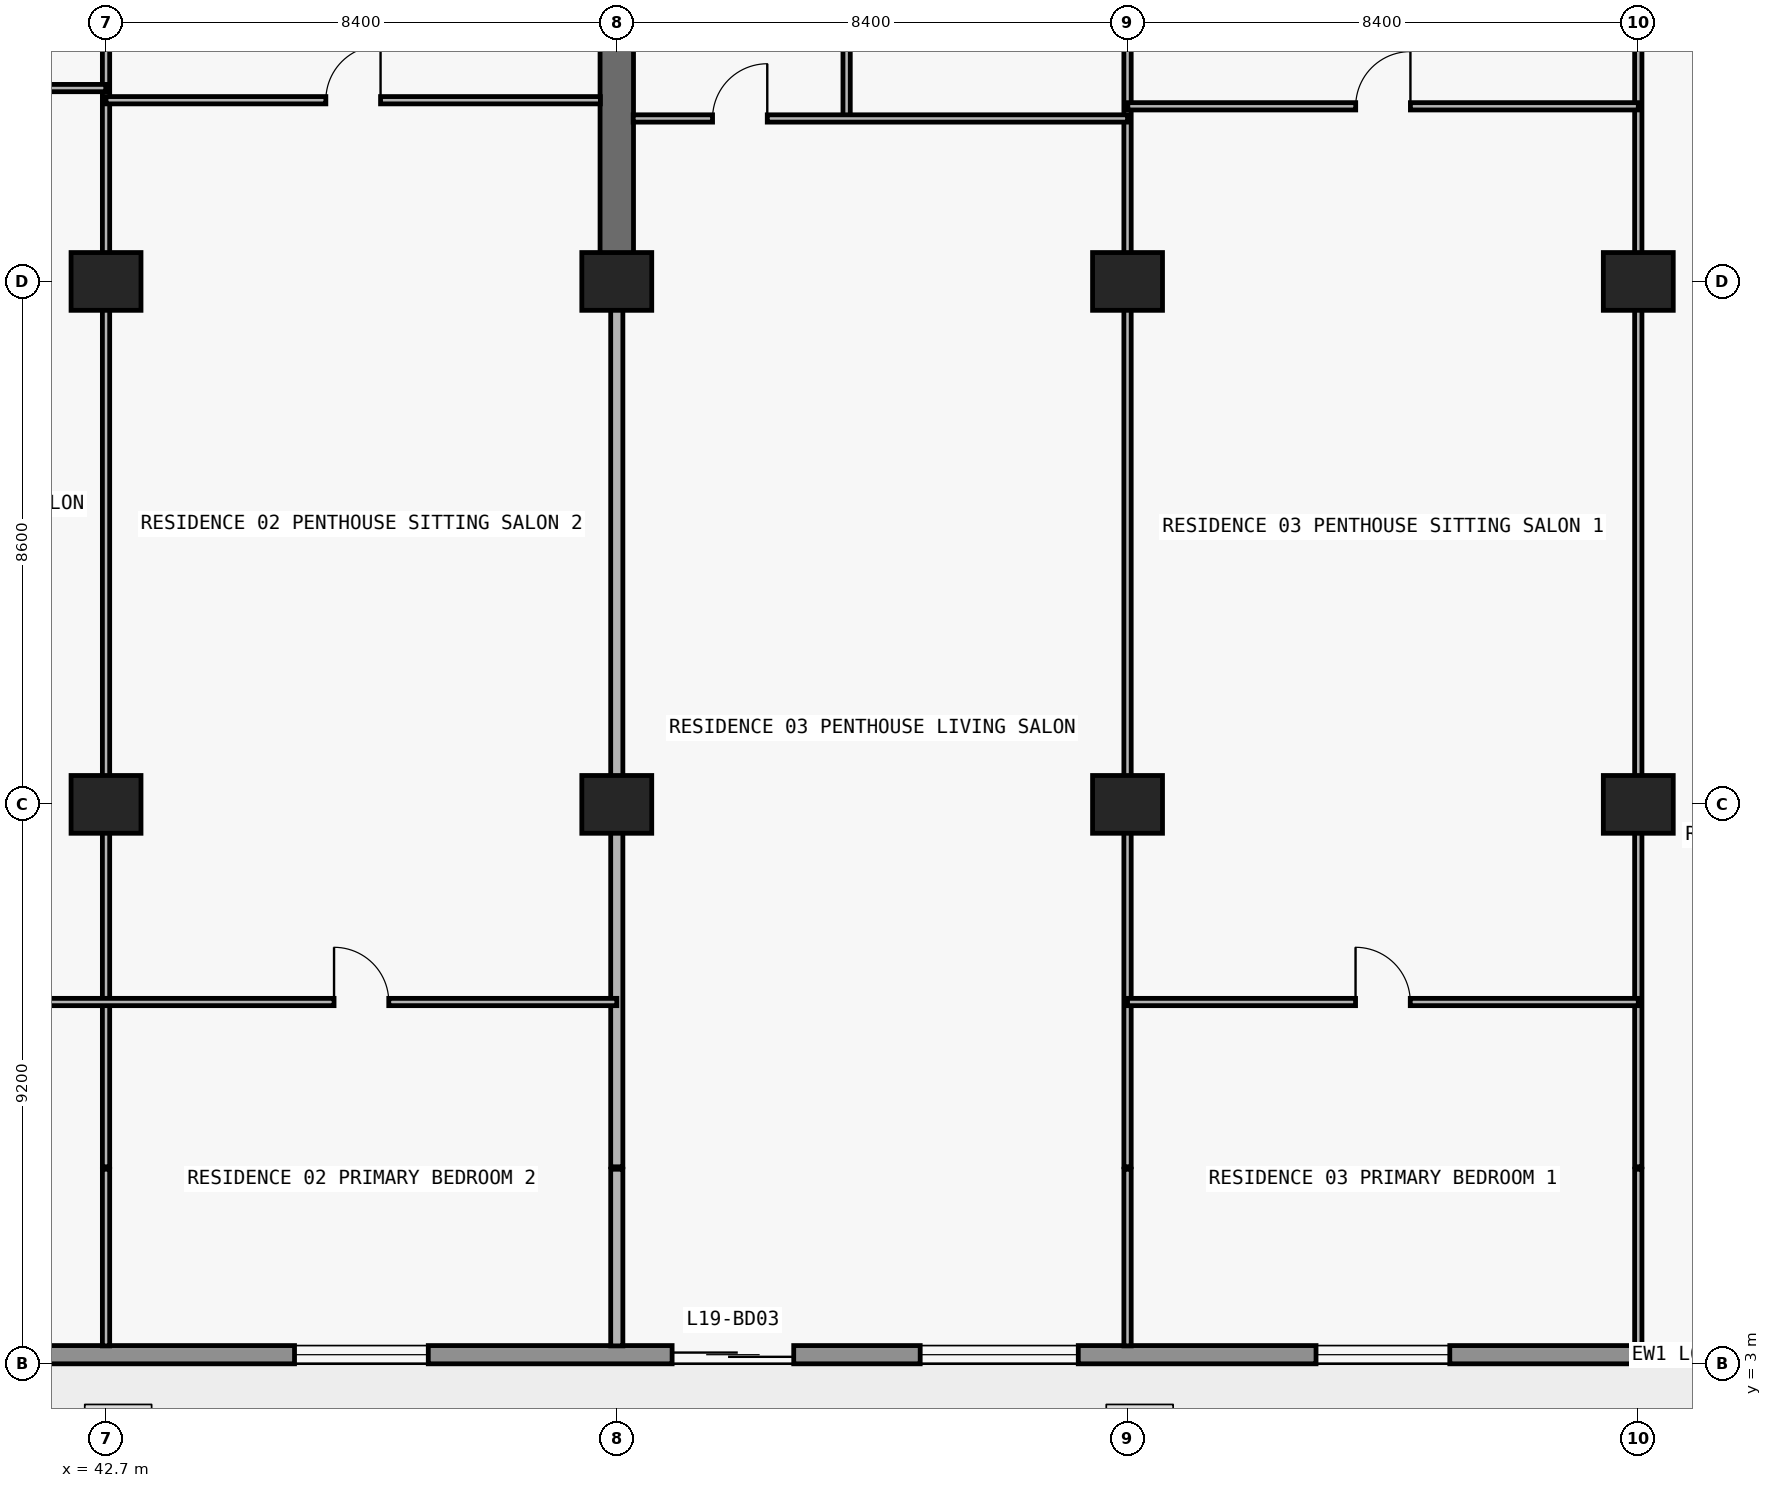
"""IFC4 building model, lengths in metres.
Left out: names, types, materials, properties, quantities, classifications, styles, units other than length and angle.
Written with IfcOpenShell. Run it as: python <this file> out.ifc"""

import sys

from ifc_helpers import new_model, si_unit, direction, frame, frame_2d, origin, origin_2d, place, context, subcontext, project, spatial, rectangle, extrude, element, fill, save


model = new_model("IFC4")
c1 = context("Model", 3, precision=1e-05, world=origin(), true_north=direction((0.0, 1.0)))
c2 = subcontext(c1, "Body", "Model", "MODEL_VIEW")
j1 = project(units=[si_unit("LENGTHUNIT", "METRE"), si_unit("PLANEANGLEUNIT", "RADIAN")], contexts=[c1])
p1 = place(None, origin())
s1 = spatial("IfcSite", under=j1, at=p1, CompositionType="ELEMENT")
p2 = place(p1, origin())
s2 = spatial("IfcBuilding", under=s1, at=p2, CompositionType="ELEMENT")
p3 = place(p2, frame((0.0, 0.0, 72.9)))
s3 = spatial("IfcBuildingStorey", under=s2, at=p3, CompositionType="ELEMENT", Elevation=72.9)
for number, where, z_axis, x_axis in (
    (1, (42.7, 12.2, 0.0), (0.0, 0.0, 1.0), (1.0, 0.0, 0.0)),
    (2, (51.1, 12.2, 0.0), (0.0, 0.0, 1.0), (1.0, 0.0, 0.0)),
    (3, (59.5, 12.2, 0.0), (0.0, 0.0, 1.0), (1.0, 0.0, 0.0)),
    (4, (67.9, 12.2, 0.0), (0.0, 0.0, 1.0), (1.0, 0.0, 0.0)),
    (5, (42.7, 20.8, 0.0), (0.0, 0.0, 1.0), (1.0, 0.0, 0.0)),
    (6, (51.1, 20.8, 0.0), (0.0, 0.0, 1.0), (1.0, 0.0, 0.0)),
    (7, (59.5, 20.8, 0.0), (0.0, 0.0, 1.0), (1.0, 0.0, 0.0)),
    (8, (67.9, 20.8, 0.0), (0.0, 0.0, 1.0), (1.0, 0.0, 0.0)),
):
    element("IfcColumn", number, at=place(p3, frame(where, z_axis=z_axis, x_axis=x_axis)), inside=s3, PredefinedType="COLUMN", context=c2, shape_type="SweptSolid", body=[
        extrude(rectangle(XDim=1.15, YDim=0.95, at=origin_2d()), origin(), (0.0, 0.0, 1.0), 3.05),
    ])
p4 = place(p3, frame((51.1, 20.8, 0.0), z_axis=(0.0, 0.0, 1.0), x_axis=(0.0, 1.0, 0.0)))
e9 = element("IfcWall", 9, at=p4, inside=s3, PredefinedType="SHEAR", context=c2, shape_type="SweptSolid", body=[
    extrude(rectangle(XDim=8.6, YDim=0.55, at=frame_2d((4.3, 0.0))), origin(), (0.0, 0.0, 1.0), 3.05),
])
p5 = place(p3, frame((72.7, 3.15, 0.0), z_axis=(0.0, 0.0, 1.0), x_axis=(-1.0, 0.0, 0.0)))
e10 = element("IfcWall", 10, at=p5, inside=s3, PredefinedType="STANDARD", context=c2, shape_type="SweptSolid", body=[
    extrude(rectangle(XDim=67.6, YDim=0.3, at=frame_2d((33.8, 0.0))), origin(), (0.0, 0.0, 1.0), 3.05),
])
p6 = place(p5, frame((59.89, 0.0, 0.0)))
e11 = element("IfcOpeningElement", 11, at=p6, cuts=e10, PredefinedType="OPENING", context=c2, shape_type="SweptSolid", body=[
    extrude(rectangle(XDim=2.0, YDim=2.3, at=frame_2d((1.0, 1.15))), frame((0.0, 0.16, 0.0), z_axis=(0.0, -1.0, 0.0), x_axis=(1.0, 0.0, 0.0)), (0.0, 0.0, 1.0), 0.32),
])
p7 = place(p5, frame((55.21, 0.0, 0.65)))
e12 = element("IfcOpeningElement", 12, at=p7, cuts=e10, PredefinedType="OPENING", context=c2, shape_type="SweptSolid", body=[
    extrude(rectangle(XDim=2.6, YDim=1.85, at=frame_2d((1.3, 0.925))), frame((0.0, 0.16, 0.0), z_axis=(0.0, -1.0, 0.0), x_axis=(1.0, 0.0, 0.0)), (0.0, 0.0, 1.0), 0.32),
])
p8 = place(p5, frame((49.1, 0.0, 0.85)))
e13 = element("IfcOpeningElement", 13, at=p8, cuts=e10, PredefinedType="OPENING", context=c2, shape_type="SweptSolid", body=[
    extrude(rectangle(XDim=2.2, YDim=1.55, at=frame_2d((1.1, 0.775))), frame((0.0, 0.16, 0.0), z_axis=(0.0, -1.0, 0.0), x_axis=(1.0, 0.0, 0.0)), (0.0, 0.0, 1.0), 0.32),
])
p9 = place(p5, frame((43.09, 0.0, 0.0)))
e14 = element("IfcOpeningElement", 14, at=p9, cuts=e10, PredefinedType="OPENING", context=c2, shape_type="SweptSolid", body=[
    extrude(rectangle(XDim=2.0, YDim=2.3, at=frame_2d((1.0, 1.15))), frame((0.0, 0.16, 0.0), z_axis=(0.0, -1.0, 0.0), x_axis=(1.0, 0.0, 0.0)), (0.0, 0.0, 1.0), 0.32),
])
p10 = place(p5, frame((38.41, 0.0, 0.65)))
e15 = element("IfcOpeningElement", 15, at=p10, cuts=e10, PredefinedType="OPENING", context=c2, shape_type="SweptSolid", body=[
    extrude(rectangle(XDim=2.6, YDim=1.85, at=frame_2d((1.3, 0.925))), frame((0.0, 0.16, 0.0), z_axis=(0.0, -1.0, 0.0), x_axis=(1.0, 0.0, 0.0)), (0.0, 0.0, 1.0), 0.32),
])
p11 = place(p5, frame((32.7, 0.0, 0.85)))
e16 = element("IfcOpeningElement", 16, at=p11, cuts=e10, PredefinedType="OPENING", context=c2, shape_type="SweptSolid", body=[
    extrude(rectangle(XDim=2.2, YDim=1.55, at=frame_2d((1.1, 0.775))), frame((0.0, 0.16, 0.0), z_axis=(0.0, -1.0, 0.0), x_axis=(1.0, 0.0, 0.0)), (0.0, 0.0, 1.0), 0.32),
])
p12 = place(p5, frame((24.7, 0.0, 0.85)))
e17 = element("IfcOpeningElement", 17, at=p12, cuts=e10, PredefinedType="OPENING", context=c2, shape_type="SweptSolid", body=[
    extrude(rectangle(XDim=2.2, YDim=1.55, at=frame_2d((1.1, 0.775))), frame((0.0, 0.16, 0.0), z_axis=(0.0, -1.0, 0.0), x_axis=(1.0, 0.0, 0.0)), (0.0, 0.0, 1.0), 0.32),
])
p13 = place(p5, frame((18.69, 0.0, 0.0)))
e18 = element("IfcOpeningElement", 18, at=p13, cuts=e10, PredefinedType="OPENING", context=c2, shape_type="SweptSolid", body=[
    extrude(rectangle(XDim=2.0, YDim=2.3, at=frame_2d((1.0, 1.15))), frame((0.0, 0.16, 0.0), z_axis=(0.0, -1.0, 0.0), x_axis=(1.0, 0.0, 0.0)), (0.0, 0.0, 1.0), 0.32),
])
p14 = place(p5, frame((14.01, 0.0, 0.65)))
e19 = element("IfcOpeningElement", 19, at=p14, cuts=e10, PredefinedType="OPENING", context=c2, shape_type="SweptSolid", body=[
    extrude(rectangle(XDim=2.6, YDim=1.85, at=frame_2d((1.3, 0.925))), frame((0.0, 0.16, 0.0), z_axis=(0.0, -1.0, 0.0), x_axis=(1.0, 0.0, 0.0)), (0.0, 0.0, 1.0), 0.32),
])
p15 = place(p5, frame((7.9, 0.0, 0.85)))
e20 = element("IfcOpeningElement", 20, at=p15, cuts=e10, PredefinedType="OPENING", context=c2, shape_type="SweptSolid", body=[
    extrude(rectangle(XDim=2.2, YDim=1.55, at=frame_2d((1.1, 0.775))), frame((0.0, 0.16, 0.0), z_axis=(0.0, -1.0, 0.0), x_axis=(1.0, 0.0, 0.0)), (0.0, 0.0, 1.0), 0.32),
])
p16 = place(p3, frame((42.7, 3.295, 0.0), z_axis=(0.0, 0.0, 1.0), x_axis=(0.0, 1.0, 0.0)))
e21 = element("IfcWall", 21, at=p16, inside=s3, PredefinedType="PARTITIONING", context=c2, shape_type="SweptSolid", body=[
    extrude(rectangle(XDim=2.905, YDim=0.12, at=frame_2d((1.453, 0.0))), origin(), (0.0, 0.0, 1.0), 3.05),
])
p17 = place(p3, frame((42.7, 6.24, 0.0), z_axis=(0.0, 0.0, 1.0), x_axis=(0.0, 1.0, 0.0)))
e22 = element("IfcWall", 22, at=p17, inside=s3, PredefinedType="PARTITIONING", context=c2, shape_type="SweptSolid", body=[
    extrude(rectangle(XDim=27.96, YDim=0.12, at=frame_2d((13.98, 0.0))), origin(), (0.0, 0.0, 1.0), 2.11),
])
p18 = place(p17, frame((19.49, 0.0, 0.0)))
e23 = element("IfcOpeningElement", 23, at=p18, cuts=e22, PredefinedType="OPENING", context=c2, shape_type="SweptSolid", body=[
    extrude(rectangle(XDim=0.9, YDim=2.06, at=frame_2d((0.45, 1.03))), frame((0.0, 0.07, 0.0), z_axis=(0.0, -1.0, 0.0), x_axis=(1.0, 0.0, 0.0)), (0.0, 0.0, 1.0), 0.14),
])
p19 = place(p3, frame((51.1, 3.295, 0.0), z_axis=(0.0, 0.0, 1.0), x_axis=(0.0, 1.0, 0.0)))
e24 = element("IfcWall", 24, at=p19, inside=s3, PredefinedType="PARTITIONING", context=c2, shape_type="SweptSolid", body=[
    extrude(rectangle(XDim=2.905, YDim=0.2, at=frame_2d((1.453, 0.0))), origin(), (0.0, 0.0, 1.0), 3.05),
])
p20 = place(p3, frame((51.1, 6.24, 0.0), z_axis=(0.0, 0.0, 1.0), x_axis=(0.0, 1.0, 0.0)))
e25 = element("IfcWall", 25, at=p20, inside=s3, PredefinedType="PARTITIONING", context=c2, shape_type="SweptSolid", body=[
    extrude(rectangle(XDim=14.555, YDim=0.2, at=frame_2d((7.277, 0.0))), origin(), (0.0, 0.0, 1.0), 2.11),
])
p21 = place(p3, frame((54.88, 23.48, 0.0), z_axis=(0.0, 0.0, 1.0), x_axis=(0.0, 1.0, 0.0)))
e26 = element("IfcWall", 26, at=p21, inside=s3, PredefinedType="PARTITIONING", context=c2, shape_type="SweptSolid", body=[
    extrude(rectangle(XDim=4.8, YDim=0.12, at=frame_2d((2.4, 0.0))), origin(), (0.0, 0.0, 1.0), 3.05),
])
p22 = place(p21, frame((1.95, 0.0, 0.0)))
e27 = element("IfcOpeningElement", 27, at=p22, cuts=e26, PredefinedType="OPENING", context=c2, shape_type="SweptSolid", body=[
    extrude(rectangle(XDim=0.9, YDim=2.15, at=frame_2d((0.45, 1.075))), frame((0.0, 0.07, 0.0), z_axis=(0.0, -1.0, 0.0), x_axis=(1.0, 0.0, 0.0)), (0.0, 0.0, 1.0), 0.14),
])
p23 = place(p3, frame((59.5, 3.295, 0.0), z_axis=(0.0, 0.0, 1.0), x_axis=(0.0, 1.0, 0.0)))
e28 = element("IfcWall", 28, at=p23, inside=s3, PredefinedType="PARTITIONING", context=c2, shape_type="SweptSolid", body=[
    extrude(rectangle(XDim=2.905, YDim=0.12, at=frame_2d((1.453, 0.0))), origin(), (0.0, 0.0, 1.0), 3.05),
])
p24 = place(p3, frame((59.5, 6.24, 0.0), z_axis=(0.0, 0.0, 1.0), x_axis=(0.0, 1.0, 0.0)))
e29 = element("IfcWall", 29, at=p24, inside=s3, PredefinedType="PARTITIONING", context=c2, shape_type="SweptSolid", body=[
    extrude(rectangle(XDim=27.96, YDim=0.12, at=frame_2d((13.98, 0.0))), origin(), (0.0, 0.0, 1.0), 2.11),
])
p25 = place(p24, frame((19.19, 0.0, 0.0)))
e30 = element("IfcOpeningElement", 30, at=p25, cuts=e29, PredefinedType="OPENING", context=c2, shape_type="SweptSolid", body=[
    extrude(rectangle(XDim=0.9, YDim=2.06, at=frame_2d((0.45, 1.03))), frame((0.0, 0.07, 0.0), z_axis=(0.0, -1.0, 0.0), x_axis=(1.0, 0.0, 0.0)), (0.0, 0.0, 1.0), 0.14),
])
p26 = place(p3, frame((67.9, 3.295, 0.0), z_axis=(0.0, 0.0, 1.0), x_axis=(0.0, 1.0, 0.0)))
e31 = element("IfcWall", 31, at=p26, inside=s3, PredefinedType="PARTITIONING", context=c2, shape_type="SweptSolid", body=[
    extrude(rectangle(XDim=2.905, YDim=0.12, at=frame_2d((1.453, 0.0))), origin(), (0.0, 0.0, 1.0), 3.05),
])
p27 = place(p3, frame((67.9, 6.24, 0.0), z_axis=(0.0, 0.0, 1.0), x_axis=(0.0, 1.0, 0.0)))
e32 = element("IfcWall", 32, at=p27, inside=s3, PredefinedType="PARTITIONING", context=c2, shape_type="SweptSolid", body=[
    extrude(rectangle(XDim=27.96, YDim=0.12, at=frame_2d((13.98, 0.0))), origin(), (0.0, 0.0, 1.0), 2.11),
])
p28 = place(p27, frame((19.19, 0.0, 0.0)))
e33 = element("IfcOpeningElement", 33, at=p28, cuts=e32, PredefinedType="OPENING", context=c2, shape_type="SweptSolid", body=[
    extrude(rectangle(XDim=0.9, YDim=2.06, at=frame_2d((0.45, 1.03))), frame((0.0, 0.07, 0.0), z_axis=(0.0, -1.0, 0.0), x_axis=(1.0, 0.0, 0.0)), (0.0, 0.0, 1.0), 0.14),
])
p29 = place(p3, frame((35.1, 8.95, 0.0), z_axis=(0.0, 0.0, 1.0), x_axis=(1.0, 0.0, 0.0)))
e34 = element("IfcWall", 34, at=p29, inside=s3, PredefinedType="PARTITIONING", context=c2, shape_type="SweptSolid", body=[
    extrude(rectangle(XDim=16.0, YDim=0.12, at=frame_2d((8.0, 0.0))), origin(), (0.0, 0.0, 1.0), 3.05),
])
p30 = place(p29, frame((3.35, 0.0, 0.0)))
e35 = element("IfcOpeningElement", 35, at=p30, cuts=e34, PredefinedType="OPENING", context=c2, shape_type="SweptSolid", body=[
    extrude(rectangle(XDim=0.9, YDim=2.15, at=frame_2d((0.45, 1.075))), frame((0.0, 0.07, 0.0), z_axis=(0.0, -1.0, 0.0), x_axis=(1.0, 0.0, 0.0)), (0.0, 0.0, 1.0), 0.14),
])
p31 = place(p29, frame((11.35, 0.0, 0.0)))
e36 = element("IfcOpeningElement", 36, at=p31, cuts=e34, PredefinedType="OPENING", context=c2, shape_type="SweptSolid", body=[
    extrude(rectangle(XDim=0.9, YDim=2.15, at=frame_2d((0.45, 1.075))), frame((0.0, 0.07, 0.0), z_axis=(0.0, -1.0, 0.0), x_axis=(1.0, 0.0, 0.0)), (0.0, 0.0, 1.0), 0.14),
])
p32 = place(p3, frame((59.5, 8.95, 0.0), z_axis=(0.0, 0.0, 1.0), x_axis=(1.0, 0.0, 0.0)))
e37 = element("IfcWall", 37, at=p32, inside=s3, PredefinedType="PARTITIONING", context=c2, shape_type="SweptSolid", body=[
    extrude(rectangle(XDim=8.4, YDim=0.12, at=frame_2d((4.2, 0.0))), origin(), (0.0, 0.0, 1.0), 3.05),
])
p33 = place(p32, frame((3.75, 0.0, 0.0)))
e38 = element("IfcOpeningElement", 38, at=p33, cuts=e37, PredefinedType="OPENING", context=c2, shape_type="SweptSolid", body=[
    extrude(rectangle(XDim=0.9, YDim=2.15, at=frame_2d((0.45, 1.075))), frame((0.0, 0.07, 0.0), z_axis=(0.0, -1.0, 0.0), x_axis=(1.0, 0.0, 0.0)), (0.0, 0.0, 1.0), 0.14),
])
p34 = place(p3, frame((51.37, 23.48, 0.0), z_axis=(0.0, 0.0, 1.0), x_axis=(1.0, 0.0, 0.0)))
e39 = element("IfcWall", 39, at=p34, inside=s3, PredefinedType="PARTITIONING", context=c2, shape_type="SweptSolid", body=[
    extrude(rectangle(XDim=8.13, YDim=0.12, at=frame_2d((4.065, 0.0))), origin(), (0.0, 0.0, 1.0), 3.05),
])
p35 = place(p34, frame((1.305, 0.0, 0.0)))
e40 = element("IfcOpeningElement", 40, at=p35, cuts=e39, PredefinedType="OPENING", context=c2, shape_type="SweptSolid", body=[
    extrude(rectangle(XDim=0.9, YDim=2.15, at=frame_2d((0.45, 1.075))), frame((0.0, 0.07, 0.0), z_axis=(0.0, -1.0, 0.0), x_axis=(1.0, 0.0, 0.0)), (0.0, 0.0, 1.0), 0.14),
])
p36 = place(p3, frame((59.505, 23.68, 0.0), z_axis=(0.0, 0.0, 1.0), x_axis=(1.0, 0.0, 0.0)))
e41 = element("IfcWall", 41, at=p36, inside=s3, PredefinedType="PARTITIONING", context=c2, shape_type="SweptSolid", body=[
    extrude(rectangle(XDim=8.395, YDim=0.12, at=frame_2d((4.198, 0.0))), origin(), (0.0, 0.0, 1.0), 3.05),
])
p37 = place(p36, frame((3.748, 0.0, 0.0)))
e42 = element("IfcOpeningElement", 42, at=p37, cuts=e41, PredefinedType="OPENING", context=c2, shape_type="SweptSolid", body=[
    extrude(rectangle(XDim=0.9, YDim=2.15, at=frame_2d((0.45, 1.075))), frame((0.0, 0.07, 0.0), z_axis=(0.0, -1.0, 0.0), x_axis=(1.0, 0.0, 0.0)), (0.0, 0.0, 1.0), 0.14),
])
p38 = place(p3, frame((42.7, 23.78, 0.0), z_axis=(0.0, 0.0, 1.0), x_axis=(1.0, 0.0, 0.0)))
e43 = element("IfcWall", 43, at=p38, inside=s3, PredefinedType="PARTITIONING", context=c2, shape_type="SweptSolid", body=[
    extrude(rectangle(XDim=8.13, YDim=0.12, at=frame_2d((4.065, 0.0))), origin(), (0.0, 0.0, 1.0), 3.05),
])
p39 = place(p38, frame((3.615, 0.0, 0.0)))
e44 = element("IfcOpeningElement", 44, at=p39, cuts=e43, PredefinedType="OPENING", context=c2, shape_type="SweptSolid", body=[
    extrude(rectangle(XDim=0.9, YDim=2.15, at=frame_2d((0.45, 1.075))), frame((0.0, 0.07, 0.0), z_axis=(0.0, -1.0, 0.0), x_axis=(1.0, 0.0, 0.0)), (0.0, 0.0, 1.0), 0.14),
])
p40 = place(p3, frame((35.105, 23.98, 0.0), z_axis=(0.0, 0.0, 1.0), x_axis=(1.0, 0.0, 0.0)))
e45 = element("IfcWall", 45, at=p40, inside=s3, PredefinedType="PARTITIONING", context=c2, shape_type="SweptSolid", body=[
    extrude(rectangle(XDim=7.59, YDim=0.12, at=frame_2d((3.795, 0.0))), origin(), (0.0, 0.0, 1.0), 3.05),
])
p41 = place(p40, frame((3.345, 0.0, 0.0)))
e46 = element("IfcOpeningElement", 46, at=p41, cuts=e45, PredefinedType="OPENING", context=c2, shape_type="SweptSolid", body=[
    extrude(rectangle(XDim=0.9, YDim=2.15, at=frame_2d((0.45, 1.075))), frame((0.0, 0.07, 0.0), z_axis=(0.0, -1.0, 0.0), x_axis=(1.0, 0.0, 0.0)), (0.0, 0.0, 1.0), 0.14),
])
p42 = place(p12, origin())
e47 = element("IfcWindow", 47, at=p42, inside=s3, PartitioningType="SINGLE_PANEL", PredefinedType="WINDOW", context=c2, shape_type="SweptSolid", body=[
    extrude(rectangle(XDim=2.2, YDim=1.55, at=frame_2d((1.1, 0.775))), frame((0.0, 0.03, 0.0), z_axis=(0.0, -1.0, 0.0), x_axis=(1.0, 0.0, 0.0)), (0.0, 0.0, 1.0), 0.06),
])
fill(e17, e47)
p43 = place(p13, origin())
e48 = element("IfcDoor", 48, at=p43, inside=s3, OperationType="DOUBLE_DOOR_SLIDING", PredefinedType="DOOR", context=c2, shape_type="SweptSolid", body=[
    extrude(rectangle(XDim=2.0, YDim=2.3, at=frame_2d((1.0, 1.15))), frame((0.0, 0.025, 0.0), z_axis=(0.0, -1.0, 0.0), x_axis=(1.0, 0.0, 0.0)), (0.0, 0.0, 1.0), 0.05),
])
fill(e18, e48)
p44 = place(p14, origin())
e49 = element("IfcWindow", 49, at=p44, inside=s3, PartitioningType="SINGLE_PANEL", PredefinedType="WINDOW", context=c2, shape_type="SweptSolid", body=[
    extrude(rectangle(XDim=2.6, YDim=1.85, at=frame_2d((1.3, 0.925))), frame((0.0, 0.03, 0.0), z_axis=(0.0, -1.0, 0.0), x_axis=(1.0, 0.0, 0.0)), (0.0, 0.0, 1.0), 0.06),
])
fill(e19, e49)
p45 = place(p15, origin())
e50 = element("IfcWindow", 50, at=p45, inside=s3, PartitioningType="SINGLE_PANEL", PredefinedType="WINDOW", context=c2, shape_type="SweptSolid", body=[
    extrude(rectangle(XDim=2.2, YDim=1.55, at=frame_2d((1.1, 0.775))), frame((0.0, 0.03, 0.0), z_axis=(0.0, -1.0, 0.0), x_axis=(1.0, 0.0, 0.0)), (0.0, 0.0, 1.0), 0.06),
])
fill(e20, e50)
p46 = place(p39, origin())
e51 = element("IfcDoor", 51, at=p46, inside=s3, OperationType="SINGLE_SWING_RIGHT", PredefinedType="DOOR", context=c2, shape_type="SweptSolid", body=[
    extrude(rectangle(XDim=0.9, YDim=2.15, at=frame_2d((0.45, 1.075))), frame((0.0, 0.025, 0.0), z_axis=(0.0, -1.0, 0.0), x_axis=(1.0, 0.0, 0.0)), (0.0, 0.0, 1.0), 0.05),
])
fill(e44, e51)
p47 = place(p31, origin())
e52 = element("IfcDoor", 52, at=p47, inside=s3, OperationType="SINGLE_SWING_LEFT", PredefinedType="DOOR", context=c2, shape_type="SweptSolid", body=[
    extrude(rectangle(XDim=0.9, YDim=2.15, at=frame_2d((0.45, 1.075))), frame((0.0, 0.025, 0.0), z_axis=(0.0, -1.0, 0.0), x_axis=(1.0, 0.0, 0.0)), (0.0, 0.0, 1.0), 0.05),
])
fill(e36, e52)
p48 = place(p35, origin())
e53 = element("IfcDoor", 53, at=p48, inside=s3, OperationType="SINGLE_SWING_RIGHT", PredefinedType="DOOR", context=c2, shape_type="SweptSolid", body=[
    extrude(rectangle(XDim=0.9, YDim=2.15, at=frame_2d((0.45, 1.075))), frame((0.0, 0.025, 0.0), z_axis=(0.0, -1.0, 0.0), x_axis=(1.0, 0.0, 0.0)), (0.0, 0.0, 1.0), 0.05),
])
fill(e40, e53)
p49 = place(p37, origin())
e54 = element("IfcDoor", 54, at=p49, inside=s3, OperationType="SINGLE_SWING_RIGHT", PredefinedType="DOOR", context=c2, shape_type="SweptSolid", body=[
    extrude(rectangle(XDim=0.9, YDim=2.15, at=frame_2d((0.45, 1.075))), frame((0.0, 0.025, 0.0), z_axis=(0.0, -1.0, 0.0), x_axis=(1.0, 0.0, 0.0)), (0.0, 0.0, 1.0), 0.05),
])
fill(e42, e54)
p50 = place(p33, origin())
e55 = element("IfcDoor", 55, at=p50, inside=s3, OperationType="SINGLE_SWING_LEFT", PredefinedType="DOOR", context=c2, shape_type="SweptSolid", body=[
    extrude(rectangle(XDim=0.9, YDim=2.15, at=frame_2d((0.45, 1.075))), frame((0.0, 0.025, 0.0), z_axis=(0.0, -1.0, 0.0), x_axis=(1.0, 0.0, 0.0)), (0.0, 0.0, 1.0), 0.05),
])
fill(e38, e55)
save(model, sys.argv[1])
